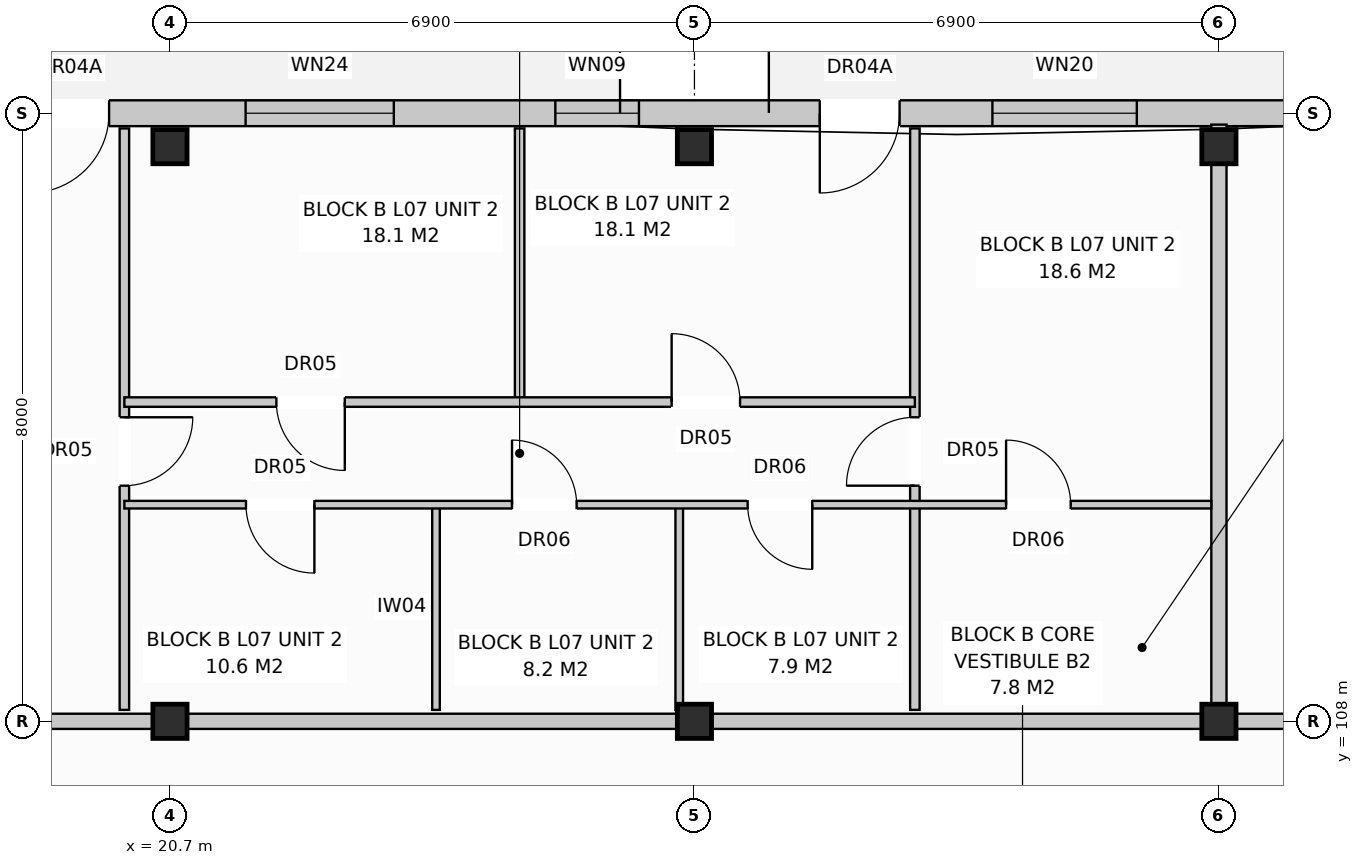
"""IFC4 building model, lengths in metres.
Left out: names, types, materials, properties, quantities, classifications, styles, units other than length and angle.
Written with IfcOpenShell. Run it as: python <this file> out.ifc"""

import sys

from ifc_helpers import new_model, si_unit, direction, frame, frame_2d, origin, origin_with_axes, origin_2d, place, context, subcontext, project, spatial, rectangle, extrude, element, fill, save


model = new_model("IFC4")
c1 = context("Model", 3, precision=1e-05, world=origin(), true_north=direction((0.0, 1.0)))
c2 = subcontext(c1, "Body", "Model", "MODEL_VIEW")
j1 = project(units=[si_unit("LENGTHUNIT", "METRE"), si_unit("PLANEANGLEUNIT", "RADIAN")], contexts=[c1])
p1 = place(None, origin())
s1 = spatial("IfcSite", under=j1, at=p1, CompositionType="ELEMENT")
p2 = place(p1, origin())
s2 = spatial("IfcBuilding", under=s1, at=p2, CompositionType="ELEMENT")
p3 = place(p2, frame((0.0, 0.0, 24.0)))
s3 = spatial("IfcBuildingStorey", under=s2, at=p3, CompositionType="ELEMENT", Elevation=24.0)
for number, where, z_axis, x_axis in (
    (1, (20.7, 108.0, 0.0), (0.0, 0.0, 1.0), (1.0, 0.0, 0.0)),
    (2, (20.7, 115.56, 0.0), (0.0, 0.0, 1.0), (1.0, 0.0, 0.0)),
    (3, (27.6, 108.0, 0.0), (0.0, 0.0, 1.0), (1.0, 0.0, 0.0)),
    (4, (27.6, 115.56, 0.0), (0.0, 0.0, 1.0), (1.0, 0.0, 0.0)),
    (5, (34.5, 108.0, 0.0), (0.0, 0.0, 1.0), (1.0, 0.0, 0.0)),
    (6, (34.5, 115.56, 0.0), (0.0, 0.0, 1.0), (1.0, 0.0, 0.0)),
):
    element("IfcColumn", number, at=place(p3, frame(where, z_axis=z_axis, x_axis=x_axis)), inside=s3, PredefinedType="COLUMN", context=c2, shape_type="SweptSolid", body=[
        extrude(rectangle(XDim=0.45, YDim=0.45, at=origin_2d()), origin(), (0.0, 0.0, 1.0), 3.2),
    ])
p4 = place(p3, frame((0.16, 116.0, 0.0), z_axis=(0.0, 0.0, 1.0), x_axis=(1.0, 0.0, 0.0)))
e7 = element("IfcWall", 7, at=p4, inside=s3, PredefinedType="STANDARD", context=c2, shape_type="SweptSolid", body=[
    extrude(rectangle(XDim=41.08, YDim=0.34, at=frame_2d((20.54, 0.0))), origin(), (0.0, 0.0, 1.0), 2.95),
])
p5 = place(p4, frame((3.789, 0.0, 0.0)))
e8 = element("IfcOpeningElement", 8, at=p5, cuts=e7, PredefinedType="OPENING", context=c2, shape_type="SweptSolid", body=[
    extrude(rectangle(XDim=1.05, YDim=2.12, at=frame_2d((0.525, 1.06))), frame((0.0, 0.182, 0.0), z_axis=(0.0, -1.0, 0.0), x_axis=(1.0, 0.0, 0.0)), (0.0, 0.0, 1.0), 0.364),
])
p6 = place(p4, frame((18.689, 0.0, 0.0)))
e9 = element("IfcOpeningElement", 9, at=p6, cuts=e7, PredefinedType="OPENING", context=c2, shape_type="SweptSolid", body=[
    extrude(rectangle(XDim=1.05, YDim=2.12, at=frame_2d((0.525, 1.06))), frame((0.0, 0.182, 0.0), z_axis=(0.0, -1.0, 0.0), x_axis=(1.0, 0.0, 0.0)), (0.0, 0.0, 1.0), 0.364),
])
p7 = place(p4, frame((29.089, 0.0, 0.0)))
e10 = element("IfcOpeningElement", 10, at=p7, cuts=e7, PredefinedType="OPENING", context=c2, shape_type="SweptSolid", body=[
    extrude(rectangle(XDim=1.05, YDim=2.12, at=frame_2d((0.525, 1.06))), frame((0.0, 0.182, 0.0), z_axis=(0.0, -1.0, 0.0), x_axis=(1.0, 0.0, 0.0)), (0.0, 0.0, 1.0), 0.364),
])
p8 = place(p4, frame((1.56, 0.0, 0.8)))
e11 = element("IfcOpeningElement", 11, at=p8, cuts=e7, PredefinedType="OPENING", context=c2, shape_type="SweptSolid", body=[
    extrude(rectangle(XDim=1.9, YDim=1.85, at=frame_2d((0.95, 0.925))), frame((0.0, 0.182, 0.0), z_axis=(0.0, -1.0, 0.0), x_axis=(1.0, 0.0, 0.0)), (0.0, 0.0, 1.0), 0.364),
])
p9 = place(p4, frame((7.192, 0.0, 0.8)))
e12 = element("IfcOpeningElement", 12, at=p9, cuts=e7, PredefinedType="OPENING", context=c2, shape_type="SweptSolid", body=[
    extrude(rectangle(XDim=1.95, YDim=1.65, at=frame_2d((0.975, 0.825))), frame((0.0, 0.182, 0.0), z_axis=(0.0, -1.0, 0.0), x_axis=(1.0, 0.0, 0.0)), (0.0, 0.0, 1.0), 0.364),
])
p10 = place(p4, frame((10.86, 0.0, 0.72)))
e13 = element("IfcOpeningElement", 13, at=p10, cuts=e7, PredefinedType="OPENING", context=c2, shape_type="SweptSolid", body=[
    extrude(rectangle(XDim=1.1, YDim=1.5, at=frame_2d((0.55, 0.75))), frame((0.0, 0.182, 0.0), z_axis=(0.0, -1.0, 0.0), x_axis=(1.0, 0.0, 0.0)), (0.0, 0.0, 1.0), 0.364),
])
p11 = place(p4, frame((15.86, 0.0, 0.8)))
e14 = element("IfcOpeningElement", 14, at=p11, cuts=e7, PredefinedType="OPENING", context=c2, shape_type="SweptSolid", body=[
    extrude(rectangle(XDim=1.9, YDim=1.85, at=frame_2d((0.95, 0.925))), frame((0.0, 0.182, 0.0), z_axis=(0.0, -1.0, 0.0), x_axis=(1.0, 0.0, 0.0)), (0.0, 0.0, 1.0), 0.364),
])
p12 = place(p4, frame((21.535, 0.0, 0.8)))
e15 = element("IfcOpeningElement", 15, at=p12, cuts=e7, PredefinedType="OPENING", context=c2, shape_type="SweptSolid", body=[
    extrude(rectangle(XDim=1.95, YDim=1.65, at=frame_2d((0.975, 0.825))), frame((0.0, 0.182, 0.0), z_axis=(0.0, -1.0, 0.0), x_axis=(1.0, 0.0, 0.0)), (0.0, 0.0, 1.0), 0.364),
])
p13 = place(p4, frame((25.61, 0.0, 0.72)))
e16 = element("IfcOpeningElement", 16, at=p13, cuts=e7, PredefinedType="OPENING", context=c2, shape_type="SweptSolid", body=[
    extrude(rectangle(XDim=1.1, YDim=1.5, at=frame_2d((0.55, 0.75))), frame((0.0, 0.182, 0.0), z_axis=(0.0, -1.0, 0.0), x_axis=(1.0, 0.0, 0.0)), (0.0, 0.0, 1.0), 0.364),
])
p14 = place(p4, frame((31.36, 0.0, 0.72)))
e17 = element("IfcOpeningElement", 17, at=p14, cuts=e7, PredefinedType="OPENING", context=c2, shape_type="SweptSolid", body=[
    extrude(rectangle(XDim=1.9, YDim=1.85, at=frame_2d((0.95, 0.925))), frame((0.0, 0.182, 0.0), z_axis=(0.0, -1.0, 0.0), x_axis=(1.0, 0.0, 0.0)), (0.0, 0.0, 1.0), 0.364),
])
p15 = place(p4, frame((35.335, 0.0, 0.8)))
e18 = element("IfcOpeningElement", 18, at=p15, cuts=e7, PredefinedType="OPENING", context=c2, shape_type="SweptSolid", body=[
    extrude(rectangle(XDim=1.95, YDim=1.65, at=frame_2d((0.975, 0.825))), frame((0.0, 0.182, 0.0), z_axis=(0.0, -1.0, 0.0), x_axis=(1.0, 0.0, 0.0)), (0.0, 0.0, 1.0), 0.364),
])
p16 = place(p4, frame((39.16, 0.0, 0.72)))
e19 = element("IfcOpeningElement", 19, at=p16, cuts=e7, PredefinedType="OPENING", context=c2, shape_type="SweptSolid", body=[
    extrude(rectangle(XDim=1.1, YDim=1.5, at=frame_2d((0.55, 0.75))), frame((0.0, 0.182, 0.0), z_axis=(0.0, -1.0, 0.0), x_axis=(1.0, 0.0, 0.0)), (0.0, 0.0, 1.0), 0.364),
])
p17 = place(p3, frame((34.5, 108.15, 0.0), z_axis=(0.0, 0.0, 1.0), x_axis=(0.0, 1.0, 0.0)))
e20 = element("IfcWall", 20, at=p17, inside=s3, PredefinedType="PARTITIONING", context=c2, shape_type="SweptSolid", body=[
    extrude(rectangle(XDim=7.7, YDim=0.2, at=frame_2d((3.85, 0.0))), origin(), (0.0, 0.0, 1.0), 2.39),
])
p18 = place(p3, frame((13.8, 108.0, 0.0), z_axis=(0.0, 0.0, 1.0), x_axis=(1.0, 0.0, 0.0)))
e21 = element("IfcWall", 21, at=p18, inside=s3, PredefinedType="PARTITIONING", context=c2, shape_type="SweptSolid", body=[
    extrude(rectangle(XDim=20.7, YDim=0.2, at=frame_2d((10.35, 0.0))), origin(), (0.0, 0.0, 1.0), 2.39),
])
p19 = place(p18, frame((2.4, 0.0, 0.0)))
e22 = element("IfcOpeningElement", 22, at=p19, cuts=e21, PredefinedType="OPENING", context=c2, shape_type="SweptSolid", body=[
    extrude(rectangle(XDim=0.95, YDim=2.15, at=frame_2d((0.475, 1.075))), frame((0.0, 0.112, 0.0), z_axis=(0.0, -1.0, 0.0), x_axis=(1.0, 0.0, 0.0)), (0.0, 0.0, 1.0), 0.224),
])
p20 = place(p3, frame((20.1, 108.15, 0.0), z_axis=(0.0, 0.0, 1.0), x_axis=(0.0, 1.0, 0.0)))
e23 = element("IfcWall", 23, at=p20, inside=s3, PredefinedType="PARTITIONING", context=c2, shape_type="SweptSolid", body=[
    extrude(rectangle(XDim=7.65, YDim=0.125, at=frame_2d((3.825, 0.0))), origin(), (0.0, 0.0, 1.0), 2.95),
])
p21 = place(p20, frame((2.95, 0.0, 0.0)))
e24 = element("IfcOpeningElement", 24, at=p21, cuts=e23, PredefinedType="OPENING", context=c2, shape_type="SweptSolid", body=[
    extrude(rectangle(XDim=0.9, YDim=2.1, at=frame_2d((0.45, 1.05))), frame((0.0, 0.074, 0.0), z_axis=(0.0, -1.0, 0.0), x_axis=(1.0, 0.0, 0.0)), (0.0, 0.0, 1.0), 0.149),
])
for number, where, z_axis, x_axis in (
    (25, (24.2, 108.15, 0.0), (0.0, 0.0, 1.0), (0.0, 1.0, 0.0)),
    (26, (27.4, 108.15, 0.0), (0.0, 0.0, 1.0), (0.0, 1.0, 0.0)),
):
    element("IfcWall", number, at=place(p3, frame(where, z_axis=z_axis, x_axis=x_axis)), inside=s3, PredefinedType="PARTITIONING", context=c2, shape_type="SweptSolid", body=[
        extrude(rectangle(XDim=2.7, YDim=0.1, at=frame_2d((1.35, 0.0))), origin(), (0.0, 0.0, 1.0), 2.95),
    ])
p22 = place(p3, frame((25.3, 112.2, 0.0), z_axis=(0.0, 0.0, 1.0), x_axis=(0.0, 1.0, 0.0)))
e27 = element("IfcWall", 27, at=p22, inside=s3, PredefinedType="PARTITIONING", context=c2, shape_type="SweptSolid", body=[
    extrude(rectangle(XDim=3.6, YDim=0.125, at=frame_2d((1.8, 0.0))), origin(), (0.0, 0.0, 1.0), 2.95),
])
p23 = place(p3, frame((30.5, 108.15, 0.0), z_axis=(0.0, 0.0, 1.0), x_axis=(0.0, 1.0, 0.0)))
e28 = element("IfcWall", 28, at=p23, inside=s3, PredefinedType="PARTITIONING", context=c2, shape_type="SweptSolid", body=[
    extrude(rectangle(XDim=7.65, YDim=0.125, at=frame_2d((3.825, 0.0))), origin(), (0.0, 0.0, 1.0), 2.95),
])
p24 = place(p23, frame((2.95, 0.0, 0.0)))
e29 = element("IfcOpeningElement", 29, at=p24, cuts=e28, PredefinedType="OPENING", context=c2, shape_type="SweptSolid", body=[
    extrude(rectangle(XDim=0.9, YDim=2.1, at=frame_2d((0.45, 1.05))), frame((0.0, 0.074, 0.0), z_axis=(0.0, -1.0, 0.0), x_axis=(1.0, 0.0, 0.0)), (0.0, 0.0, 1.0), 0.149),
])
p25 = place(p3, frame((20.1, 110.85, 0.0), z_axis=(0.0, 0.0, 1.0), x_axis=(1.0, 0.0, 0.0)))
e30 = element("IfcWall", 30, at=p25, inside=s3, PredefinedType="PARTITIONING", context=c2, shape_type="SweptSolid", body=[
    extrude(rectangle(XDim=14.3, YDim=0.1, at=frame_2d((7.15, 0.0))), origin(), (0.0, 0.0, 1.0), 2.95),
])
p26 = place(p25, frame((1.6, 0.0, 0.0)))
e31 = element("IfcOpeningElement", 31, at=p26, cuts=e30, PredefinedType="OPENING", context=c2, shape_type="SweptSolid", body=[
    extrude(rectangle(XDim=0.9, YDim=2.1, at=frame_2d((0.45, 1.05))), frame((0.0, 0.062, 0.0), z_axis=(0.0, -1.0, 0.0), x_axis=(1.0, 0.0, 0.0)), (0.0, 0.0, 1.0), 0.124),
])
p27 = place(p25, frame((5.1, 0.0, 0.0)))
e32 = element("IfcOpeningElement", 32, at=p27, cuts=e30, PredefinedType="OPENING", context=c2, shape_type="SweptSolid", body=[
    extrude(rectangle(XDim=0.85, YDim=2.05, at=frame_2d((0.425, 1.025))), frame((0.0, 0.062, 0.0), z_axis=(0.0, -1.0, 0.0), x_axis=(1.0, 0.0, 0.0)), (0.0, 0.0, 1.0), 0.124),
])
p28 = place(p25, frame((8.2, 0.0, 0.0)))
e33 = element("IfcOpeningElement", 33, at=p28, cuts=e30, PredefinedType="OPENING", context=c2, shape_type="SweptSolid", body=[
    extrude(rectangle(XDim=0.85, YDim=2.05, at=frame_2d((0.425, 1.025))), frame((0.0, 0.062, 0.0), z_axis=(0.0, -1.0, 0.0), x_axis=(1.0, 0.0, 0.0)), (0.0, 0.0, 1.0), 0.124),
])
p29 = place(p25, frame((11.6, 0.0, 0.0)))
e34 = element("IfcOpeningElement", 34, at=p29, cuts=e30, PredefinedType="OPENING", context=c2, shape_type="SweptSolid", body=[
    extrude(rectangle(XDim=0.85, YDim=2.05, at=frame_2d((0.425, 1.025))), frame((0.0, 0.062, 0.0), z_axis=(0.0, -1.0, 0.0), x_axis=(1.0, 0.0, 0.0)), (0.0, 0.0, 1.0), 0.124),
])
p30 = place(p3, frame((20.1, 112.2, 0.0), z_axis=(0.0, 0.0, 1.0), x_axis=(1.0, 0.0, 0.0)))
e35 = element("IfcWall", 35, at=p30, inside=s3, PredefinedType="PARTITIONING", context=c2, shape_type="SweptSolid", body=[
    extrude(rectangle(XDim=10.4, YDim=0.125, at=frame_2d((5.2, 0.0))), origin(), (0.0, 0.0, 1.0), 2.95),
])
p31 = place(p30, frame((2.0, 0.0, 0.0)))
e36 = element("IfcOpeningElement", 36, at=p31, cuts=e35, PredefinedType="OPENING", context=c2, shape_type="SweptSolid", body=[
    extrude(rectangle(XDim=0.9, YDim=2.1, at=frame_2d((0.45, 1.05))), frame((0.0, 0.074, 0.0), z_axis=(0.0, -1.0, 0.0), x_axis=(1.0, 0.0, 0.0)), (0.0, 0.0, 1.0), 0.149),
])
p32 = place(p30, frame((7.2, 0.0, 0.0)))
e37 = element("IfcOpeningElement", 37, at=p32, cuts=e35, PredefinedType="OPENING", context=c2, shape_type="SweptSolid", body=[
    extrude(rectangle(XDim=0.9, YDim=2.1, at=frame_2d((0.45, 1.05))), frame((0.0, 0.074, 0.0), z_axis=(0.0, -1.0, 0.0), x_axis=(1.0, 0.0, 0.0)), (0.0, 0.0, 1.0), 0.149),
])
p33 = place(p3, frame((34.5, 108.0, 0.0), z_axis=(0.0, 0.0, 1.0), x_axis=(1.0, 0.0, 0.0)))
e38 = element("IfcWall", 38, at=p33, inside=s3, PredefinedType="PARTITIONING", context=c2, shape_type="SweptSolid", body=[
    extrude(rectangle(XDim=6.9, YDim=0.2, at=frame_2d((3.45, 0.0))), origin(), (0.0, 0.0, 1.0), 2.39),
])
p34 = place(p33, frame((2.0, 0.0, 0.0)))
e39 = element("IfcOpeningElement", 39, at=p34, cuts=e38, PredefinedType="OPENING", context=c2, shape_type="SweptSolid", body=[
    extrude(rectangle(XDim=0.95, YDim=2.15, at=frame_2d((0.475, 1.075))), frame((0.0, 0.112, 0.0), z_axis=(0.0, -1.0, 0.0), x_axis=(1.0, 0.0, 0.0)), (0.0, 0.0, 1.0), 0.224),
])
p35 = place(p6, frame((1.05, 0.0, 0.0), z_axis=(0.0, 0.0, 1.0), x_axis=(-1.0, 0.0, 0.0)))
e40 = element("IfcDoor", 40, at=p35, inside=s3, OperationType="SINGLE_SWING_LEFT", PredefinedType="DOOR", context=c2, shape_type="SweptSolid", body=[
    extrude(rectangle(XDim=1.05, YDim=2.12, at=frame_2d((0.525, 1.06))), frame((0.0, 0.025, 0.0), z_axis=(0.0, -1.0, 0.0), x_axis=(1.0, 0.0, 0.0)), (0.0, 0.0, 1.0), 0.05),
])
fill(e9, e40)
p36 = place(p7, frame((1.05, 0.0, 0.0), z_axis=(0.0, 0.0, 1.0), x_axis=(-1.0, 0.0, 0.0)))
e41 = element("IfcDoor", 41, at=p36, inside=s3, OperationType="SINGLE_SWING_LEFT", PredefinedType="DOOR", context=c2, shape_type="SweptSolid", body=[
    extrude(rectangle(XDim=1.05, YDim=2.12, at=frame_2d((0.525, 1.06))), frame((0.0, 0.025, 0.0), z_axis=(0.0, -1.0, 0.0), x_axis=(1.0, 0.0, 0.0)), (0.0, 0.0, 1.0), 0.05),
])
fill(e10, e41)
p37 = place(p12, origin_with_axes())
e42 = element("IfcWindow", 42, at=p37, inside=s3, PartitioningType="SINGLE_PANEL", PredefinedType="WINDOW", context=c2, shape_type="SweptSolid", body=[
    extrude(rectangle(XDim=1.95, YDim=1.65, at=frame_2d((0.975, 0.825))), frame((0.0, 0.03, 0.0), z_axis=(0.0, -1.0, 0.0), x_axis=(1.0, 0.0, 0.0)), (0.0, 0.0, 1.0), 0.06),
])
fill(e15, e42)
p38 = place(p13, origin_with_axes())
e43 = element("IfcWindow", 43, at=p38, inside=s3, PartitioningType="SINGLE_PANEL", PredefinedType="WINDOW", context=c2, shape_type="SweptSolid", body=[
    extrude(rectangle(XDim=1.1, YDim=1.5, at=frame_2d((0.55, 0.75))), frame((0.0, 0.03, 0.0), z_axis=(0.0, -1.0, 0.0), x_axis=(1.0, 0.0, 0.0)), (0.0, 0.0, 1.0), 0.06),
])
fill(e16, e43)
p39 = place(p14, origin_with_axes())
e44 = element("IfcWindow", 44, at=p39, inside=s3, PartitioningType="SINGLE_PANEL", PredefinedType="WINDOW", context=c2, shape_type="SweptSolid", body=[
    extrude(rectangle(XDim=1.9, YDim=1.85, at=frame_2d((0.95, 0.925))), frame((0.0, 0.03, 0.0), z_axis=(0.0, -1.0, 0.0), x_axis=(1.0, 0.0, 0.0)), (0.0, 0.0, 1.0), 0.06),
])
fill(e17, e44)
p40 = place(p21, frame((0.9, 0.0, 0.0), z_axis=(0.0, 0.0, 1.0), x_axis=(-1.0, 0.0, 0.0)))
e45 = element("IfcDoor", 45, at=p40, inside=s3, OperationType="SINGLE_SWING_RIGHT", PredefinedType="DOOR", context=c2, shape_type="SweptSolid", body=[
    extrude(rectangle(XDim=0.9, YDim=2.1, at=frame_2d((0.45, 1.05))), frame((0.0, 0.025, 0.0), z_axis=(0.0, -1.0, 0.0), x_axis=(1.0, 0.0, 0.0)), (0.0, 0.0, 1.0), 0.05),
])
fill(e24, e45)
p41 = place(p24, origin_with_axes())
e46 = element("IfcDoor", 46, at=p41, inside=s3, OperationType="SINGLE_SWING_LEFT", PredefinedType="DOOR", context=c2, shape_type="SweptSolid", body=[
    extrude(rectangle(XDim=0.9, YDim=2.1, at=frame_2d((0.45, 1.05))), frame((0.0, 0.025, 0.0), z_axis=(0.0, -1.0, 0.0), x_axis=(1.0, 0.0, 0.0)), (0.0, 0.0, 1.0), 0.05),
])
fill(e29, e46)
p42 = place(p26, frame((0.9, 0.0, 0.0), z_axis=(0.0, 0.0, 1.0), x_axis=(-1.0, 0.0, 0.0)))
e47 = element("IfcDoor", 47, at=p42, inside=s3, OperationType="SINGLE_SWING_RIGHT", PredefinedType="DOOR", context=c2, shape_type="SweptSolid", body=[
    extrude(rectangle(XDim=0.9, YDim=2.1, at=frame_2d((0.45, 1.05))), frame((0.0, 0.025, 0.0), z_axis=(0.0, -1.0, 0.0), x_axis=(1.0, 0.0, 0.0)), (0.0, 0.0, 1.0), 0.05),
])
fill(e31, e47)
p43 = place(p27, origin_with_axes())
e48 = element("IfcDoor", 48, at=p43, inside=s3, OperationType="SINGLE_SWING_LEFT", PredefinedType="DOOR", context=c2, shape_type="SweptSolid", body=[
    extrude(rectangle(XDim=0.85, YDim=2.05, at=frame_2d((0.425, 1.025))), frame((0.0, 0.025, 0.0), z_axis=(0.0, -1.0, 0.0), x_axis=(1.0, 0.0, 0.0)), (0.0, 0.0, 1.0), 0.05),
])
fill(e32, e48)
p44 = place(p28, frame((0.85, 0.0, 0.0), z_axis=(0.0, 0.0, 1.0), x_axis=(-1.0, 0.0, 0.0)))
e49 = element("IfcDoor", 49, at=p44, inside=s3, OperationType="SINGLE_SWING_RIGHT", PredefinedType="DOOR", context=c2, shape_type="SweptSolid", body=[
    extrude(rectangle(XDim=0.85, YDim=2.05, at=frame_2d((0.425, 1.025))), frame((0.0, 0.025, 0.0), z_axis=(0.0, -1.0, 0.0), x_axis=(1.0, 0.0, 0.0)), (0.0, 0.0, 1.0), 0.05),
])
fill(e33, e49)
p45 = place(p29, origin_with_axes())
e50 = element("IfcDoor", 50, at=p45, inside=s3, OperationType="SINGLE_SWING_LEFT", PredefinedType="DOOR", context=c2, shape_type="SweptSolid", body=[
    extrude(rectangle(XDim=0.85, YDim=2.05, at=frame_2d((0.425, 1.025))), frame((0.0, 0.025, 0.0), z_axis=(0.0, -1.0, 0.0), x_axis=(1.0, 0.0, 0.0)), (0.0, 0.0, 1.0), 0.05),
])
fill(e34, e50)
p46 = place(p31, frame((0.9, 0.0, 0.0), z_axis=(0.0, 0.0, 1.0), x_axis=(-1.0, 0.0, 0.0)))
e51 = element("IfcDoor", 51, at=p46, inside=s3, OperationType="SINGLE_SWING_RIGHT", PredefinedType="DOOR", context=c2, shape_type="SweptSolid", body=[
    extrude(rectangle(XDim=0.9, YDim=2.1, at=frame_2d((0.45, 1.05))), frame((0.0, 0.025, 0.0), z_axis=(0.0, -1.0, 0.0), x_axis=(1.0, 0.0, 0.0)), (0.0, 0.0, 1.0), 0.05),
])
fill(e36, e51)
p47 = place(p32, origin_with_axes())
e52 = element("IfcDoor", 52, at=p47, inside=s3, OperationType="SINGLE_SWING_LEFT", PredefinedType="DOOR", context=c2, shape_type="SweptSolid", body=[
    extrude(rectangle(XDim=0.9, YDim=2.1, at=frame_2d((0.45, 1.05))), frame((0.0, 0.025, 0.0), z_axis=(0.0, -1.0, 0.0), x_axis=(1.0, 0.0, 0.0)), (0.0, 0.0, 1.0), 0.05),
])
fill(e37, e52)
save(model, sys.argv[1])
